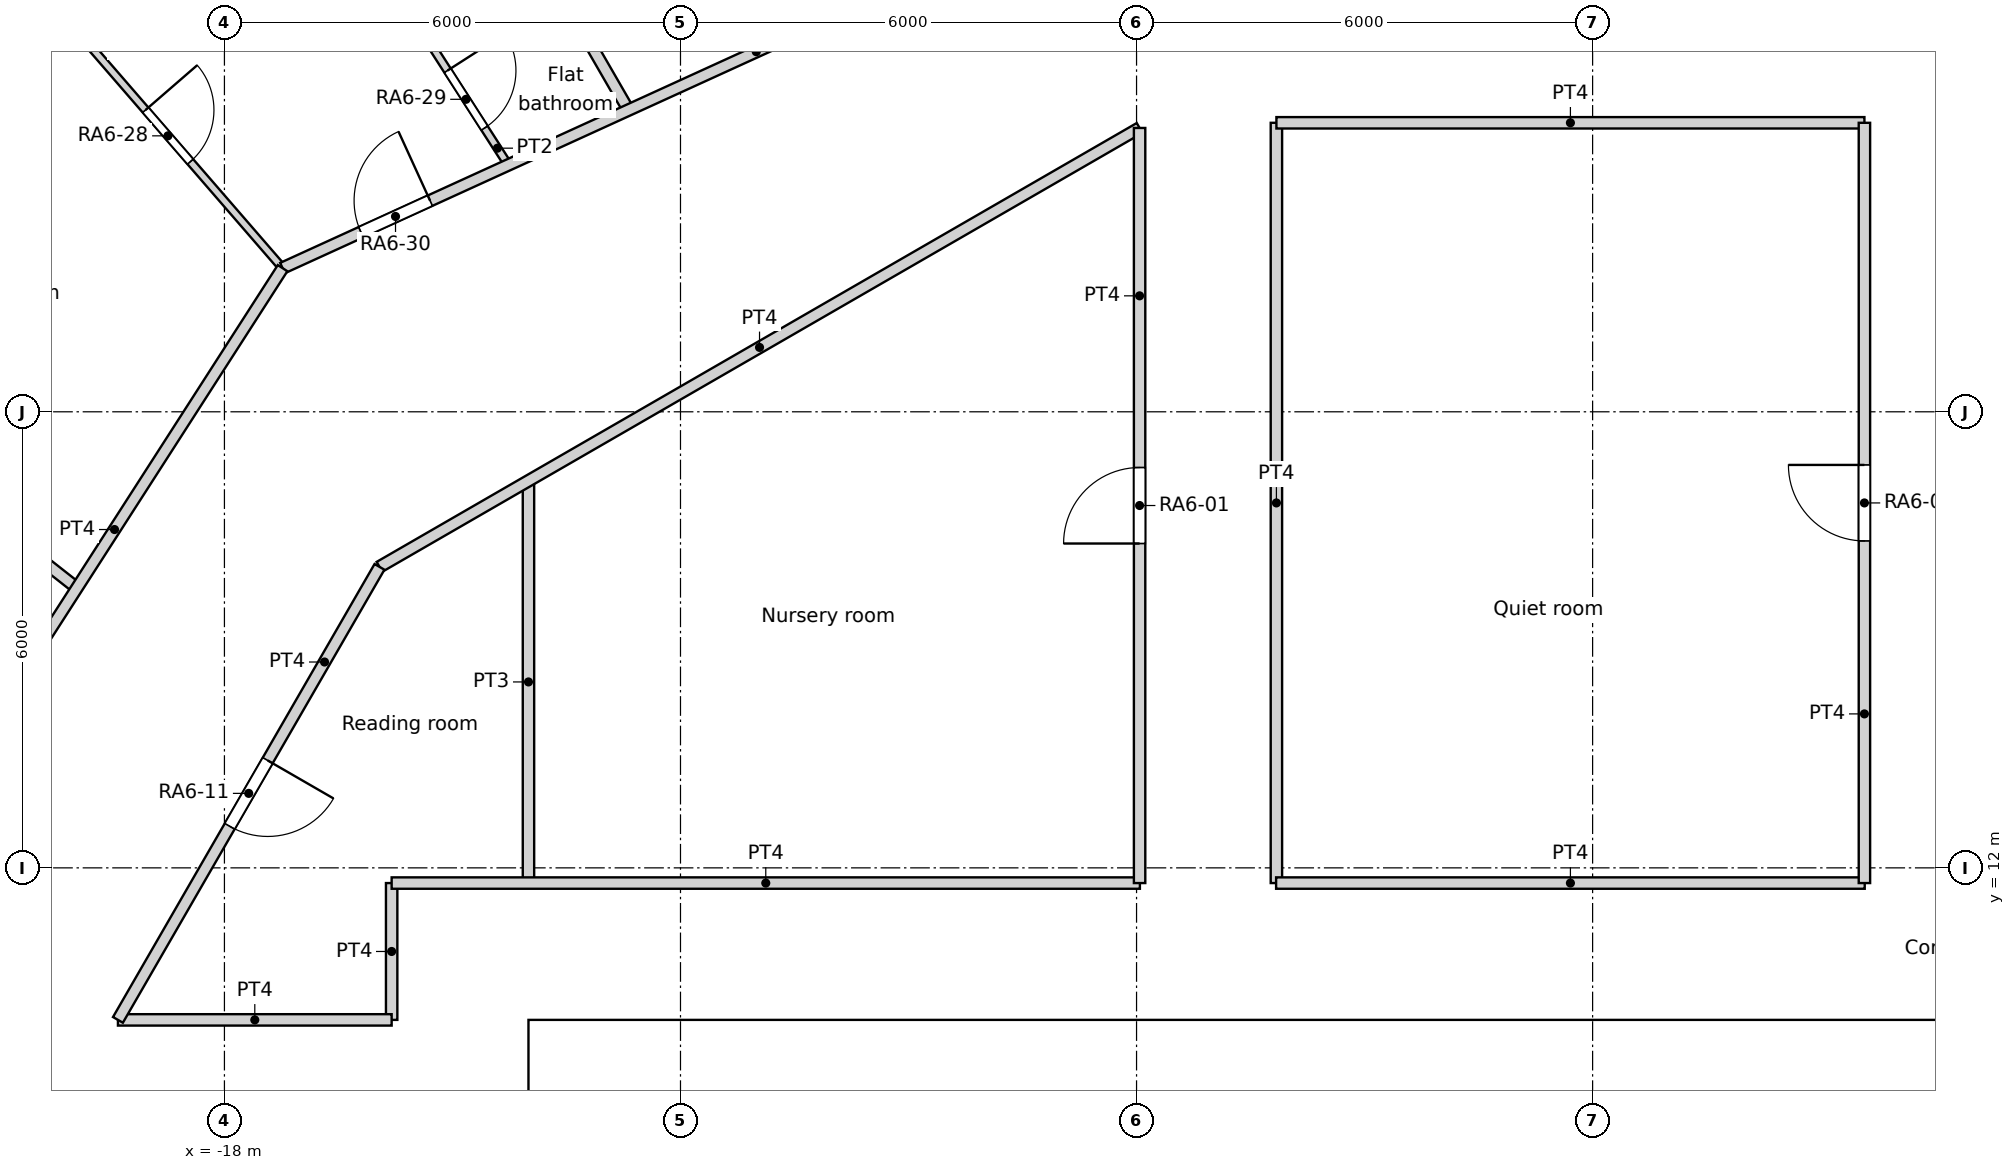
"""IFC4 building model, lengths in metres.
Left out: names, types, materials, properties, quantities, classifications, styles, units other than length and angle.
Written with IfcOpenShell. Run it as: python <this file> out.ifc"""

import sys

from ifc_helpers import new_model, si_unit, direction, frame, frame_2d, origin, origin_2d, place, context, subcontext, project, spatial, rectangle, circle, extrude, element, fill, save


model = new_model("IFC4")
c1 = context("Model", 3, precision=1e-05, world=origin(), true_north=direction((0.0, 1.0)))
c2 = subcontext(c1, "Body", "Model", "MODEL_VIEW")
j1 = project(units=[si_unit("LENGTHUNIT", "METRE"), si_unit("PLANEANGLEUNIT", "RADIAN")], contexts=[c1])
p1 = place(None, origin())
s1 = spatial("IfcSite", under=j1, at=p1, CompositionType="ELEMENT")
p2 = place(p1, origin())
s2 = spatial("IfcBuilding", under=s1, at=p2, CompositionType="ELEMENT")
p3 = place(p2, frame((0.0, 0.0, 82.2)))
s3 = spatial("IfcBuildingStorey", under=s2, at=p3, CompositionType="ELEMENT", Elevation=82.2)
p4 = place(p3, frame((-19.826, 22.88, 0.0), z_axis=(0.0, 0.0, 1.0), x_axis=(1.0, 0.0, 0.0)))
e1 = element("IfcColumn", 1, at=p4, inside=s3, PredefinedType="COLUMN", context=c2, shape_type="SweptSolid", body=[
    extrude(circle(Radius=0.6, at=origin_2d()), origin(), (0.0, 0.0, 1.0), 3.6),
])
for number, where, z_axis, x_axis in (
    (2, (-12.274, 21.259, 0.0), (0.0, 0.0, 1.0), (1.0, 0.0, 0.0)),
    (3, (-16.846, 17.855, 0.0), (0.0, 0.0, 1.0), (1.0, 0.0, 0.0)),
    (4, (-20.509, 13.489, 0.0), (0.0, 0.0, 1.0), (1.0, 0.0, 0.0)),
):
    element("IfcColumn", number, at=place(p3, frame(where, z_axis=z_axis, x_axis=x_axis)), inside=s3, PredefinedType="COLUMN", context=c2, shape_type="SweptSolid", body=[
        extrude(circle(Radius=0.65, at=origin_2d()), origin(), (0.0, 0.0, 1.0), 3.6),
    ])
for number, where, z_axis, x_axis in (
    (5, (1.406, 18.77, 0.0), (0.0, 0.0, 1.0), (1.0, 0.0, 0.0)),
    (6, (-4.188, 18.35, 0.0), (0.0, 0.0, 1.0), (1.0, 0.0, 0.0)),
    (7, (-9.411, 16.301, 0.0), (0.0, 0.0, 1.0), (1.0, 0.0, 0.0)),
    (8, (-13.798, 12.802, 0.0), (0.0, 0.0, 1.0), (1.0, 0.0, 0.0)),
):
    element("IfcColumn", number, at=place(p3, frame(where, z_axis=z_axis, x_axis=x_axis)), inside=s3, PredefinedType="COLUMN", context=c2, shape_type="SweptSolid", body=[
        extrude(circle(Radius=0.7, at=origin_2d()), origin(), (0.0, 0.0, 1.0), 3.6),
    ])
p5 = place(p3, frame((-14.0, 9.4, 0.0), z_axis=(0.0, 0.0, 1.0), x_axis=(1.0, 0.0, 0.0)))
e9 = element("IfcWall", 9, at=p5, inside=s3, PredefinedType="SOLIDWALL", context=c2, shape_type="SweptSolid", body=[
    extrude(rectangle(XDim=28.0, YDim=1.2, at=frame_2d((14.0, 0.0))), origin(), (0.0, 0.0, 1.0), 3.6),
])
p6 = place(p5, frame((9.8, 0.0, 0.0)))
e10 = element("IfcOpeningElement", 10, at=p6, cuts=e9, PredefinedType="OPENING", context=c2, shape_type="SweptSolid", body=[
    extrude(rectangle(XDim=1.8, YDim=2.1, at=frame_2d((0.9, 1.05))), frame((0.0, 0.6, 0.0), z_axis=(0.0, -1.0, 0.0), x_axis=(1.0, 0.0, 0.0)), (0.0, 0.0, 1.0), 1.2),
])
p7 = place(p3, frame((-15.8, 11.8, 0.0), z_axis=(0.0, 0.0, 1.0), x_axis=(1.0, 0.0, 0.0)))
e11 = element("IfcWall", 11, at=p7, inside=s3, PredefinedType="PARTITIONING", context=c2, shape_type="SweptSolid", body=[
    extrude(rectangle(XDim=9.844, YDim=0.15, at=frame_2d((4.922, 0.0))), origin(), (0.0, 0.0, 1.0), 3.15),
])
p8 = place(p3, frame((-4.164, 11.8, 0.0), z_axis=(0.0, 0.0, 1.0), x_axis=(1.0, 0.0, 0.0)))
e12 = element("IfcWall", 12, at=p8, inside=s3, PredefinedType="PARTITIONING", context=c2, shape_type="SweptSolid", body=[
    extrude(rectangle(XDim=7.744, YDim=0.15, at=frame_2d((3.872, 0.0))), origin(), (0.0, 0.0, 1.0), 3.15),
])
p9 = place(p3, frame((-15.8, 10.0, 0.0), z_axis=(0.0, 0.0, 1.0), x_axis=(0.0, 1.0, 0.0)))
e13 = element("IfcWall", 13, at=p9, inside=s3, PredefinedType="PARTITIONING", context=c2, shape_type="SweptSolid", body=[
    extrude(rectangle(XDim=1.8, YDim=0.15, at=frame_2d((0.9, 0.0))), origin(), (0.0, 0.0, 1.0), 3.15),
])
p10 = place(p3, frame((-5.96, 11.8, 0.0), z_axis=(0.0, 0.0, 1.0), x_axis=(0.0, 1.0, 0.0)))
e14 = element("IfcWall", 14, at=p10, inside=s3, PredefinedType="PARTITIONING", context=c2, shape_type="SweptSolid", body=[
    extrude(rectangle(XDim=9.934, YDim=0.15, at=frame_2d((4.967, 0.0))), origin(), (0.0, 0.0, 1.0), 3.15),
])
p11 = place(p10, frame((4.467, 0.0, 0.0)))
e15 = element("IfcOpeningElement", 15, at=p11, cuts=e14, PredefinedType="OPENING", context=c2, shape_type="SweptSolid", body=[
    extrude(rectangle(XDim=1.0, YDim=2.04, at=frame_2d((0.5, 1.02))), frame((0.0, 0.075, 0.0), z_axis=(0.0, -1.0, 0.0), x_axis=(1.0, 0.0, 0.0)), (0.0, 0.0, 1.0), 0.15),
])
p12 = place(p3, frame((-15.96, 15.96, 0.0), z_axis=(0.0, 0.0, 1.0), x_axis=(0.86602397904, 0.500002467721, 0.0)))
e16 = element("IfcWall", 16, at=p12, inside=s3, PredefinedType="PARTITIONING", context=c2, shape_type="SweptSolid", body=[
    extrude(rectangle(XDim=11.547, YDim=0.15, at=frame_2d((5.774, 0.0))), origin(), (0.0, 0.0, 1.0), 3.15),
])
p13 = place(p3, frame((3.576, 11.8, 0.0), z_axis=(0.0, 0.0, 1.0), x_axis=(0.0, 1.0, 0.0)))
e17 = element("IfcWall", 17, at=p13, inside=s3, PredefinedType="PARTITIONING", context=c2, shape_type="SweptSolid", body=[
    extrude(rectangle(XDim=10.002, YDim=0.15, at=frame_2d((5.001, 0.0))), origin(), (0.0, 0.0, 1.0), 3.15),
])
p14 = place(p13, frame((4.501, 0.0, 0.0)))
e18 = element("IfcOpeningElement", 18, at=p14, cuts=e17, PredefinedType="OPENING", context=c2, shape_type="SweptSolid", body=[
    extrude(rectangle(XDim=1.0, YDim=2.04, at=frame_2d((0.5, 1.02))), frame((0.0, 0.075, 0.0), z_axis=(0.0, -1.0, 0.0), x_axis=(1.0, 0.0, 0.0)), (0.0, 0.0, 1.0), 0.15),
])
p15 = place(p3, frame((-4.16, 21.802, 0.0), z_axis=(0.0, 0.0, 1.0), x_axis=(1.0, 0.0, 0.0)))
e19 = element("IfcWall", 19, at=p15, inside=s3, PredefinedType="PARTITIONING", context=c2, shape_type="SweptSolid", body=[
    extrude(rectangle(XDim=7.736, YDim=0.15, at=frame_2d((3.868, 0.0))), origin(), (0.0, 0.0, 1.0), 3.15),
])
p16 = place(p3, frame((-4.16, 11.8, 0.0), z_axis=(0.0, 0.0, 1.0), x_axis=(0.0, 1.0, 0.0)))
e20 = element("IfcWall", 20, at=p16, inside=s3, PredefinedType="PARTITIONING", context=c2, shape_type="SweptSolid", body=[
    extrude(rectangle(XDim=10.002, YDim=0.15, at=frame_2d((5.001, 0.0))), origin(), (0.0, 0.0, 1.0), 3.15),
])
p17 = place(p3, frame((-17.236, 19.891, 0.0), z_axis=(0.0, 0.0, 1.0), x_axis=(0.909645678785, 0.415385049163, 0.0)))
e21 = element("IfcWall", 21, at=p17, inside=s3, PredefinedType="PARTITIONING", context=c2, shape_type="SweptSolid", body=[
    extrude(rectangle(XDim=14.829, YDim=0.15, at=frame_2d((7.415, 0.0))), origin(), (0.0, 0.0, 1.0), 3.15),
])
p18 = place(p17, frame((11.569, 0.0, 0.0)))
e22 = element("IfcOpeningElement", 22, at=p18, cuts=e21, PredefinedType="OPENING", context=c2, shape_type="SweptSolid", body=[
    extrude(rectangle(XDim=1.0, YDim=2.1, at=frame_2d((0.5, 1.05))), frame((0.0, 0.075, 0.0), z_axis=(0.0, -1.0, 0.0), x_axis=(1.0, 0.0, 0.0)), (0.0, 0.0, 1.0), 0.15),
])
p19 = place(p17, frame((1.134, 0.0, 0.0)))
e23 = element("IfcOpeningElement", 23, at=p19, cuts=e21, PredefinedType="OPENING", context=c2, shape_type="SweptSolid", body=[
    extrude(rectangle(XDim=1.0, YDim=2.1, at=frame_2d((0.5, 1.05))), frame((0.0, 0.075, 0.0), z_axis=(0.0, -1.0, 0.0), x_axis=(1.0, 0.0, 0.0)), (0.0, 0.0, 1.0), 0.15),
])
p20 = place(p3, frame((-25.255, 7.416, 0.0), z_axis=(0.0, 0.0, 1.0), x_axis=(0.540805851332, 0.841147449123, 0.0)))
e24 = element("IfcWall", 24, at=p20, inside=s3, PredefinedType="PARTITIONING", context=c2, shape_type="SweptSolid", body=[
    extrude(rectangle(XDim=14.829, YDim=0.15, at=frame_2d((7.415, 0.0))), origin(), (0.0, 0.0, 1.0), 3.15),
])
p21 = place(p20, frame((5.603, 0.0, 0.0)))
e25 = element("IfcOpeningElement", 25, at=p21, cuts=e24, PredefinedType="OPENING", context=c2, shape_type="SweptSolid", body=[
    extrude(rectangle(XDim=1.0, YDim=2.1, at=frame_2d((0.5, 1.05))), frame((0.0, 0.075, 0.0), z_axis=(0.0, -1.0, 0.0), x_axis=(1.0, 0.0, 0.0)), (0.0, 0.0, 1.0), 0.15),
])
p22 = place(p20, frame((3.013, 0.0, 0.0)))
e26 = element("IfcOpeningElement", 26, at=p22, cuts=e24, PredefinedType="OPENING", context=c2, shape_type="SweptSolid", body=[
    extrude(rectangle(XDim=1.0, YDim=2.1, at=frame_2d((0.5, 1.05))), frame((0.0, 0.075, 0.0), z_axis=(0.0, -1.0, 0.0), x_axis=(1.0, 0.0, 0.0)), (0.0, 0.0, 1.0), 0.15),
])
p23 = place(p3, frame((-19.401, 10.0, 0.0), z_axis=(0.0, 0.0, 1.0), x_axis=(0.499992689227, 0.86602962462, 0.0)))
e27 = element("IfcWall", 27, at=p23, inside=s3, PredefinedType="PARTITIONING", context=c2, shape_type="SweptSolid", body=[
    extrude(rectangle(XDim=6.882, YDim=0.15, at=frame_2d((3.441, 0.0))), origin(), (0.0, 0.0, 1.0), 3.15),
])
p24 = place(p23, frame((2.941, 0.0, 0.0)))
e28 = element("IfcOpeningElement", 28, at=p24, cuts=e27, PredefinedType="OPENING", context=c2, shape_type="SweptSolid", body=[
    extrude(rectangle(XDim=1.0, YDim=2.04, at=frame_2d((0.5, 1.02))), frame((0.0, 0.075, 0.0), z_axis=(0.0, -1.0, 0.0), x_axis=(1.0, 0.0, 0.0)), (0.0, 0.0, 1.0), 0.15),
])
p25 = place(p3, frame((-19.401, 10.0, 0.0), z_axis=(0.0, 0.0, 1.0), x_axis=(1.0, 0.0, 0.0)))
e29 = element("IfcWall", 29, at=p25, inside=s3, PredefinedType="PARTITIONING", context=c2, shape_type="SweptSolid", body=[
    extrude(rectangle(XDim=3.601, YDim=0.15, at=frame_2d((1.8, 0.0))), origin(), (0.0, 0.0, 1.0), 3.15),
])
p26 = place(p3, frame((-14.0, 11.8, 0.0), z_axis=(0.0, 0.0, 1.0), x_axis=(0.0, 1.0, 0.0)))
e30 = element("IfcWall", 30, at=p26, inside=s3, PredefinedType="PARTITIONING", context=c2, shape_type="SweptSolid", body=[
    extrude(rectangle(XDim=5.292, YDim=0.15, at=frame_2d((2.646, 0.0))), origin(), (0.0, 0.0, 1.0), 3.15),
])
p27 = place(p3, frame((-15.612, 27.041, 0.0), z_axis=(0.0, 0.0, 1.0), x_axis=(0.499985873194, -0.866033559746, 0.0)))
e31 = element("IfcWall", 31, at=p27, inside=s3, PredefinedType="PARTITIONING", context=c2, shape_type="SweptSolid", body=[
    extrude(rectangle(XDim=5.857, YDim=0.15, at=frame_2d((2.928, 0.0))), origin(), (0.0, 0.0, 1.0), 3.15),
])
p28 = place(p3, frame((-20.448, 23.598, 0.0), z_axis=(0.0, 0.0, 1.0), x_axis=(0.654847179409, -0.755761319214, 0.0)))
e32 = element("IfcWall", 32, at=p28, inside=s3, PredefinedType="PARTITIONING", context=c2, shape_type="SweptSolid", body=[
    extrude(rectangle(XDim=4.906, YDim=0.1, at=frame_2d((2.453, 0.0))), origin(), (0.0, 0.0, 1.0), 3.15),
])
p29 = place(p28, frame((2.153, 0.0, 0.0)))
e33 = element("IfcOpeningElement", 33, at=p29, cuts=e32, PredefinedType="OPENING", context=c2, shape_type="SweptSolid", body=[
    extrude(rectangle(XDim=0.9, YDim=2.1, at=frame_2d((0.45, 1.05))), frame((0.0, 0.05, 0.0), z_axis=(0.0, -1.0, 0.0), x_axis=(1.0, 0.0, 0.0)), (0.0, 0.0, 1.0), 0.1),
])
p30 = place(p3, frame((-15.377, 22.976, 0.0), z_axis=(0.0, 0.0, 1.0), x_axis=(0.54031338164, -0.841463873033, 0.0)))
e34 = element("IfcWall", 34, at=p30, inside=s3, PredefinedType="PARTITIONING", context=c2, shape_type="SweptSolid", body=[
    extrude(rectangle(XDim=2.056, YDim=0.1, at=frame_2d((1.028, 0.0))), origin(), (0.0, 0.0, 1.0), 3.15),
])
p31 = place(p30, frame((0.578, 0.0, 0.0)))
e35 = element("IfcOpeningElement", 35, at=p31, cuts=e34, PredefinedType="OPENING", context=c2, shape_type="SweptSolid", body=[
    extrude(rectangle(XDim=0.9, YDim=2.0, at=frame_2d((0.45, 1.0))), frame((0.0, 0.05, 0.0), z_axis=(0.0, -1.0, 0.0), x_axis=(1.0, 0.0, 0.0)), (0.0, 0.0, 1.0), 0.1),
])
p32 = place(p3, frame((-24.544, 19.302, 0.0), z_axis=(0.0, 0.0, 1.0), x_axis=(0.786034767432, -0.618182290581, 0.0)))
e36 = element("IfcWall", 36, at=p32, inside=s3, PredefinedType="PARTITIONING", context=c2, shape_type="SweptSolid", body=[
    extrude(rectangle(XDim=5.857, YDim=0.15, at=frame_2d((2.929, 0.0))), origin(), (0.0, 0.0, 1.0), 3.15),
])
p33 = place(p6, origin())
e37 = element("IfcDoor", 37, at=p33, inside=s3, OperationType="DOUBLE_DOOR_SINGLE_SWING", PredefinedType="DOOR", context=c2, shape_type="SweptSolid", body=[
    extrude(rectangle(XDim=1.8, YDim=2.1, at=frame_2d((0.9, 1.05))), frame((0.0, 0.025, 0.0), z_axis=(0.0, -1.0, 0.0), x_axis=(1.0, 0.0, 0.0)), (0.0, 0.0, 1.0), 0.05),
])
fill(e10, e37)
p34 = place(p11, origin())
e38 = element("IfcDoor", 38, at=p34, inside=s3, OperationType="SINGLE_SWING_LEFT", PredefinedType="DOOR", context=c2, shape_type="SweptSolid", body=[
    extrude(rectangle(XDim=1.0, YDim=2.04, at=frame_2d((0.5, 1.02))), frame((0.0, 0.025, 0.0), z_axis=(0.0, -1.0, 0.0), x_axis=(1.0, 0.0, 0.0)), (0.0, 0.0, 1.0), 0.05),
])
fill(e15, e38)
p35 = place(p14, origin())
e39 = element("IfcDoor", 39, at=p35, inside=s3, OperationType="SINGLE_SWING_RIGHT", PredefinedType="DOOR", context=c2, shape_type="SweptSolid", body=[
    extrude(rectangle(XDim=1.0, YDim=2.04, at=frame_2d((0.5, 1.02))), frame((0.0, 0.025, 0.0), z_axis=(0.0, -1.0, 0.0), x_axis=(1.0, 0.0, 0.0)), (0.0, 0.0, 1.0), 0.05),
])
fill(e18, e39)
p36 = place(p24, origin())
e40 = element("IfcDoor", 40, at=p36, inside=s3, OperationType="SINGLE_SWING_LEFT", PredefinedType="DOOR", context=c2, shape_type="SweptSolid", body=[
    extrude(rectangle(XDim=1.0, YDim=2.04, at=frame_2d((0.5, 1.02))), frame((0.0, 0.025, 0.0), z_axis=(0.0, -1.0, 0.0), x_axis=(1.0, 0.0, 0.0)), (0.0, 0.0, 1.0), 0.05),
])
fill(e28, e40)
p37 = place(p29, origin())
e41 = element("IfcDoor", 41, at=p37, inside=s3, OperationType="SINGLE_SWING_LEFT", PredefinedType="DOOR", context=c2, shape_type="SweptSolid", body=[
    extrude(rectangle(XDim=0.9, YDim=2.1, at=frame_2d((0.45, 1.05))), frame((0.0, 0.025, 0.0), z_axis=(0.0, -1.0, 0.0), x_axis=(1.0, 0.0, 0.0)), (0.0, 0.0, 1.0), 0.05),
])
fill(e33, e41)
p38 = place(p31, origin())
e42 = element("IfcDoor", 42, at=p38, inside=s3, OperationType="SINGLE_SWING_LEFT", PredefinedType="DOOR", context=c2, shape_type="SweptSolid", body=[
    extrude(rectangle(XDim=0.9, YDim=2.0, at=frame_2d((0.45, 1.0))), frame((0.0, 0.025, 0.0), z_axis=(0.0, -1.0, 0.0), x_axis=(1.0, 0.0, 0.0)), (0.0, 0.0, 1.0), 0.05),
])
fill(e35, e42)
p39 = place(p19, origin())
e43 = element("IfcDoor", 43, at=p39, inside=s3, OperationType="SINGLE_SWING_RIGHT", PredefinedType="DOOR", context=c2, shape_type="SweptSolid", body=[
    extrude(rectangle(XDim=1.0, YDim=2.1, at=frame_2d((0.5, 1.05))), frame((0.0, 0.025, 0.0), z_axis=(0.0, -1.0, 0.0), x_axis=(1.0, 0.0, 0.0)), (0.0, 0.0, 1.0), 0.05),
])
fill(e23, e43)
save(model, sys.argv[1])
